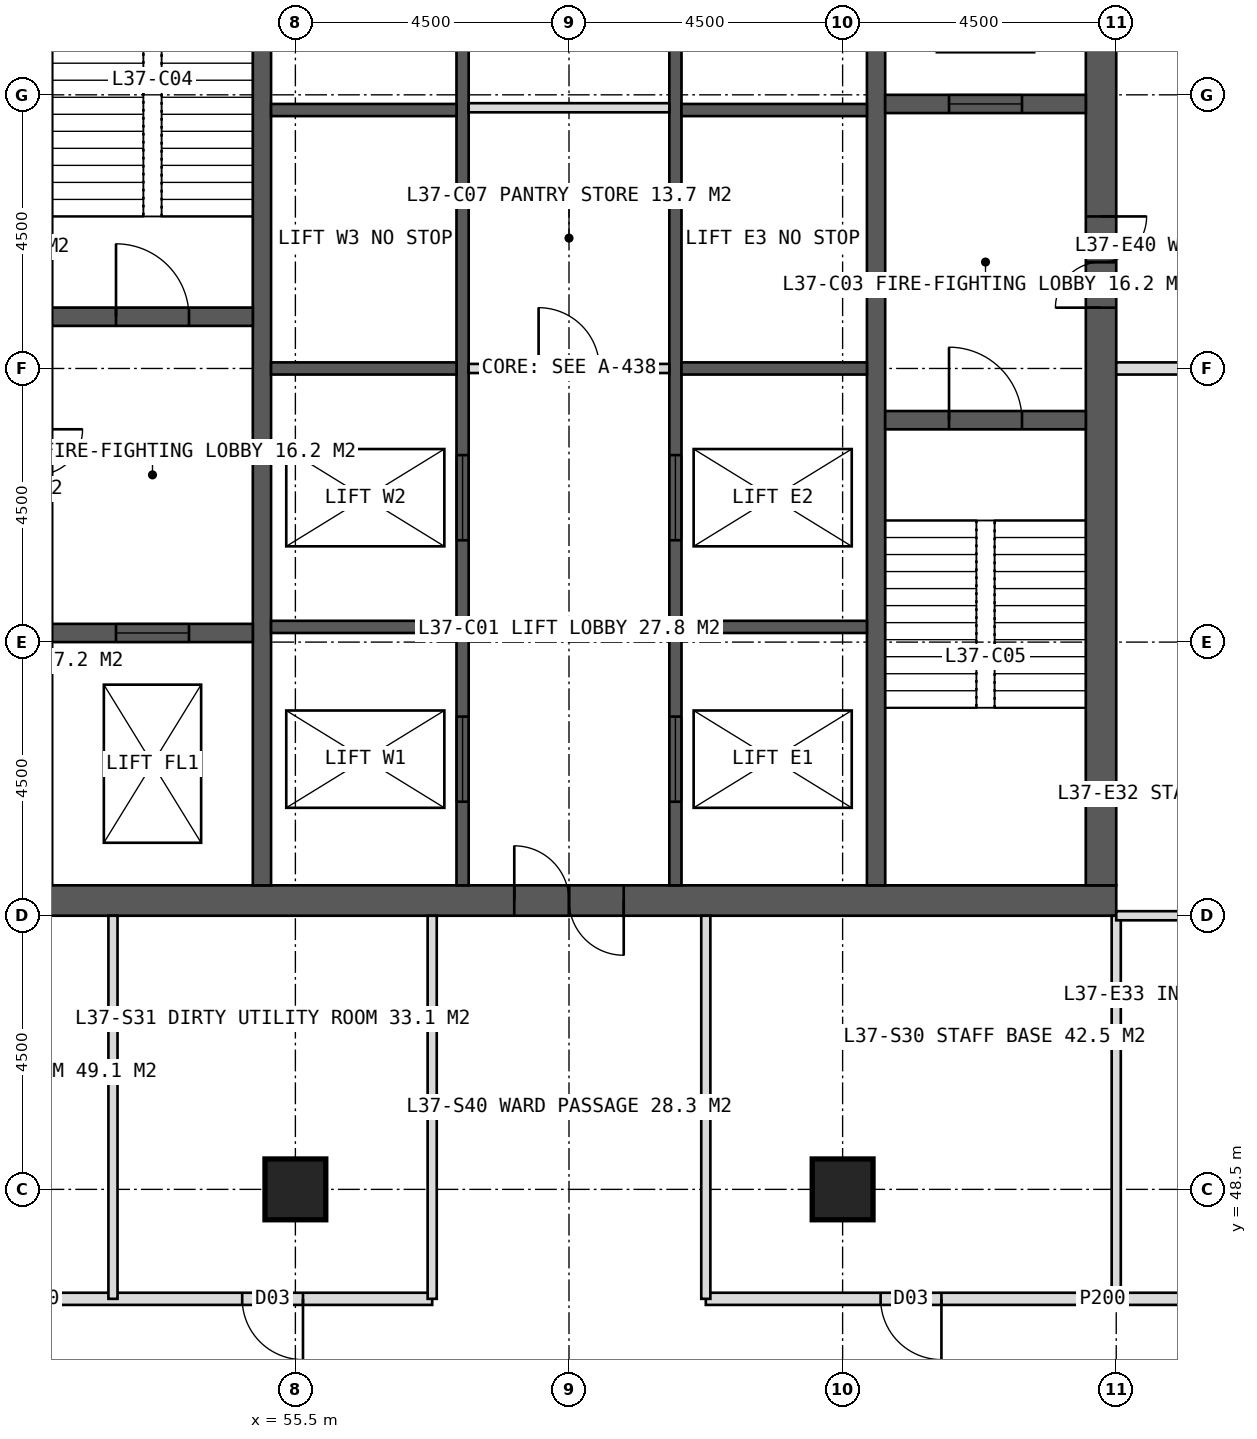
"""IFC4 building model, lengths in metres.
Left out: names, types, materials, properties, quantities, classifications, styles, units other than length and angle.
Written with IfcOpenShell. Run it as: python <this file> out.ifc"""

import sys

from ifc_helpers import new_model, si_unit, direction, frame, frame_2d, origin, origin_2d, place, context, subcontext, project, spatial, rectangle, hollow_rectangle, extrude, element, fill, save


model = new_model("IFC4")
c1 = context("Model", 3, precision=1e-05, world=origin(), true_north=direction((0.0, 1.0)))
c2 = subcontext(c1, "Body", "Model", "MODEL_VIEW")
j1 = project(units=[si_unit("LENGTHUNIT", "METRE"), si_unit("PLANEANGLEUNIT", "RADIAN")], contexts=[c1])
p1 = place(None, origin())
s1 = spatial("IfcSite", under=j1, at=p1, CompositionType="ELEMENT")
p2 = place(p1, origin())
s2 = spatial("IfcBuilding", under=s1, at=p2, CompositionType="ELEMENT")
p3 = place(p2, frame((0.0, 0.0, 156.0)))
s3 = spatial("IfcBuildingStorey", under=s2, at=p3, CompositionType="ELEMENT", Elevation=156.0)
p4 = place(p3, frame((51.0, 53.25, 0.0), z_axis=(0.0, 0.0, 1.0), x_axis=(1.0, 0.0, 0.0)))
e1 = element("IfcWall", 1, at=p4, inside=s3, PredefinedType="SHEAR", context=c2, shape_type="SweptSolid", body=[
    extrude(rectangle(XDim=18.0, YDim=0.5, at=frame_2d((9.0, 0.0))), origin(), (0.0, 0.0, 1.0), 4.0),
])
p5 = place(p4, frame((8.1, 0.0, 0.0)))
e2 = element("IfcOpeningElement", 2, at=p5, cuts=e1, PredefinedType="OPENING", context=c2, shape_type="SweptSolid", body=[
    extrude(rectangle(XDim=1.8, YDim=2.2, at=frame_2d((0.9, 1.1))), frame((0.0, 0.26, 0.0), z_axis=(0.0, -1.0, 0.0), x_axis=(1.0, 0.0, 0.0)), (0.0, 0.0, 1.0), 0.52),
])
p6 = place(p3, frame((68.75, 53.5, 0.0), z_axis=(0.0, 0.0, 1.0), x_axis=(0.0, 1.0, 0.0)))
e3 = element("IfcWall", 3, at=p6, inside=s3, PredefinedType="SHEAR", context=c2, shape_type="SweptSolid", body=[
    extrude(rectangle(XDim=17.0, YDim=0.5, at=frame_2d((8.5, 0.0))), origin(), (0.0, 0.0, 1.0), 4.0),
])
p7 = place(p6, frame((9.5, 0.0, 0.0)))
e4 = element("IfcOpeningElement", 4, at=p7, cuts=e3, PredefinedType="OPENING", context=c2, shape_type="SweptSolid", body=[
    extrude(rectangle(XDim=1.5, YDim=2.2, at=frame_2d((0.75, 1.1))), frame((0.0, 0.26, 0.0), z_axis=(0.0, -1.0, 0.0), x_axis=(1.0, 0.0, 0.0)), (0.0, 0.0, 1.0), 0.52),
])
for number, where, z_axis, x_axis in (
    (5, (54.95, 53.5, 0.0), (0.0, 0.0, 1.0), (0.0, 1.0, 0.0)),
    (6, (65.05, 53.5, 0.0), (0.0, 0.0, 1.0), (0.0, 1.0, 0.0)),
):
    element("IfcWall", number, at=place(p3, frame(where, z_axis=z_axis, x_axis=x_axis)), inside=s3, PredefinedType="SHEAR", context=c2, shape_type="SweptSolid", body=[
        extrude(rectangle(XDim=17.0, YDim=0.3, at=frame_2d((8.5, 0.0))), origin(), (0.0, 0.0, 1.0), 4.0),
    ])
p8 = place(p3, frame((58.25, 53.5, 0.0), z_axis=(0.0, 0.0, 1.0), x_axis=(0.0, 1.0, 0.0)))
e7 = element("IfcWall", 7, at=p8, inside=s3, PredefinedType="SHEAR", context=c2, shape_type="SweptSolid", body=[
    extrude(rectangle(XDim=17.0, YDim=0.2, at=frame_2d((8.5, 0.0))), origin(), (0.0, 0.0, 1.0), 4.0),
])
p9 = place(p8, frame((1.375, 0.0, 0.0)))
e8 = element("IfcOpeningElement", 8, at=p9, cuts=e7, PredefinedType="OPENING", context=c2, shape_type="SweptSolid", body=[
    extrude(rectangle(XDim=1.4, YDim=2.2, at=frame_2d((0.7, 1.1))), frame((0.0, 0.11, 0.0), z_axis=(0.0, -1.0, 0.0), x_axis=(1.0, 0.0, 0.0)), (0.0, 0.0, 1.0), 0.22),
])
p10 = place(p8, frame((5.675, 0.0, 0.0)))
e9 = element("IfcOpeningElement", 9, at=p10, cuts=e7, PredefinedType="OPENING", context=c2, shape_type="SweptSolid", body=[
    extrude(rectangle(XDim=1.4, YDim=2.2, at=frame_2d((0.7, 1.1))), frame((0.0, 0.11, 0.0), z_axis=(0.0, -1.0, 0.0), x_axis=(1.0, 0.0, 0.0)), (0.0, 0.0, 1.0), 0.22),
])
p11 = place(p3, frame((61.75, 53.5, 0.0), z_axis=(0.0, 0.0, 1.0), x_axis=(0.0, 1.0, 0.0)))
e10 = element("IfcWall", 10, at=p11, inside=s3, PredefinedType="SHEAR", context=c2, shape_type="SweptSolid", body=[
    extrude(rectangle(XDim=17.0, YDim=0.2, at=frame_2d((8.5, 0.0))), origin(), (0.0, 0.0, 1.0), 4.0),
])
p12 = place(p11, frame((1.375, 0.0, 0.0)))
e11 = element("IfcOpeningElement", 11, at=p12, cuts=e10, PredefinedType="OPENING", context=c2, shape_type="SweptSolid", body=[
    extrude(rectangle(XDim=1.4, YDim=2.2, at=frame_2d((0.7, 1.1))), frame((0.0, 0.11, 0.0), z_axis=(0.0, -1.0, 0.0), x_axis=(1.0, 0.0, 0.0)), (0.0, 0.0, 1.0), 0.22),
])
p13 = place(p11, frame((5.675, 0.0, 0.0)))
e12 = element("IfcOpeningElement", 12, at=p13, cuts=e10, PredefinedType="OPENING", context=c2, shape_type="SweptSolid", body=[
    extrude(rectangle(XDim=1.4, YDim=2.2, at=frame_2d((0.7, 1.1))), frame((0.0, 0.11, 0.0), z_axis=(0.0, -1.0, 0.0), x_axis=(1.0, 0.0, 0.0)), (0.0, 0.0, 1.0), 0.22),
])
for number, where, z_axis, x_axis in (
    (13, (55.1, 57.75, 0.0), (0.0, 0.0, 1.0), (1.0, 0.0, 0.0)),
    (14, (61.85, 57.75, 0.0), (0.0, 0.0, 1.0), (1.0, 0.0, 0.0)),
    (15, (55.1, 62.0, 0.0), (0.0, 0.0, 1.0), (1.0, 0.0, 0.0)),
    (16, (61.85, 62.0, 0.0), (0.0, 0.0, 1.0), (1.0, 0.0, 0.0)),
    (17, (55.1, 66.25, 0.0), (0.0, 0.0, 1.0), (1.0, 0.0, 0.0)),
    (18, (61.85, 66.25, 0.0), (0.0, 0.0, 1.0), (1.0, 0.0, 0.0)),
):
    element("IfcWall", number, at=place(p3, frame(where, z_axis=z_axis, x_axis=x_axis)), inside=s3, PredefinedType="SHEAR", context=c2, shape_type="SweptSolid", body=[
        extrude(rectangle(XDim=3.05, YDim=0.2, at=frame_2d((1.525, 0.0))), origin(), (0.0, 0.0, 1.0), 4.0),
    ])
p14 = place(p3, frame((51.5, 62.85, 0.0), z_axis=(0.0, 0.0, 1.0), x_axis=(1.0, 0.0, 0.0)))
e19 = element("IfcWall", 19, at=p14, inside=s3, PredefinedType="SHEAR", context=c2, shape_type="SweptSolid", body=[
    extrude(rectangle(XDim=3.3, YDim=0.3, at=frame_2d((1.65, 0.0))), origin(), (0.0, 0.0, 1.0), 4.0),
])
p15 = place(p14, frame((1.05, 0.0, 0.0)))
e20 = element("IfcOpeningElement", 20, at=p15, cuts=e19, PredefinedType="OPENING", context=c2, shape_type="SweptSolid", body=[
    extrude(rectangle(XDim=1.2, YDim=2.1, at=frame_2d((0.6, 1.05))), frame((0.0, 0.16, 0.0), z_axis=(0.0, -1.0, 0.0), x_axis=(1.0, 0.0, 0.0)), (0.0, 0.0, 1.0), 0.32),
])
p16 = place(p3, frame((51.5, 57.65, 0.0), z_axis=(0.0, 0.0, 1.0), x_axis=(1.0, 0.0, 0.0)))
e21 = element("IfcWall", 21, at=p16, inside=s3, PredefinedType="SHEAR", context=c2, shape_type="SweptSolid", body=[
    extrude(rectangle(XDim=3.3, YDim=0.3, at=frame_2d((1.65, 0.0))), origin(), (0.0, 0.0, 1.0), 4.0),
])
p17 = place(p16, frame((1.05, 0.0, 0.0)))
e22 = element("IfcOpeningElement", 22, at=p17, cuts=e21, PredefinedType="OPENING", context=c2, shape_type="SweptSolid", body=[
    extrude(rectangle(XDim=1.2, YDim=2.2, at=frame_2d((0.6, 1.1))), frame((0.0, 0.16, 0.0), z_axis=(0.0, -1.0, 0.0), x_axis=(1.0, 0.0, 0.0)), (0.0, 0.0, 1.0), 0.32),
])
p18 = place(p3, frame((65.2, 61.15, 0.0), z_axis=(0.0, 0.0, 1.0), x_axis=(1.0, 0.0, 0.0)))
e23 = element("IfcWall", 23, at=p18, inside=s3, PredefinedType="SHEAR", context=c2, shape_type="SweptSolid", body=[
    extrude(rectangle(XDim=3.3, YDim=0.3, at=frame_2d((1.65, 0.0))), origin(), (0.0, 0.0, 1.0), 4.0),
])
p19 = place(p18, frame((1.05, 0.0, 0.0)))
e24 = element("IfcOpeningElement", 24, at=p19, cuts=e23, PredefinedType="OPENING", context=c2, shape_type="SweptSolid", body=[
    extrude(rectangle(XDim=1.2, YDim=2.1, at=frame_2d((0.6, 1.05))), frame((0.0, 0.16, 0.0), z_axis=(0.0, -1.0, 0.0), x_axis=(1.0, 0.0, 0.0)), (0.0, 0.0, 1.0), 0.32),
])
p20 = place(p3, frame((65.2, 66.35, 0.0), z_axis=(0.0, 0.0, 1.0), x_axis=(1.0, 0.0, 0.0)))
e25 = element("IfcWall", 25, at=p20, inside=s3, PredefinedType="SHEAR", context=c2, shape_type="SweptSolid", body=[
    extrude(rectangle(XDim=3.3, YDim=0.3, at=frame_2d((1.65, 0.0))), origin(), (0.0, 0.0, 1.0), 4.0),
])
p21 = place(p20, frame((1.05, 0.0, 0.0)))
e26 = element("IfcOpeningElement", 26, at=p21, cuts=e25, PredefinedType="OPENING", context=c2, shape_type="SweptSolid", body=[
    extrude(rectangle(XDim=1.2, YDim=2.2, at=frame_2d((0.6, 1.1))), frame((0.0, 0.16, 0.0), z_axis=(0.0, -1.0, 0.0), x_axis=(1.0, 0.0, 0.0)), (0.0, 0.0, 1.0), 0.32),
])
for number, where, z_axis, x_axis in (
    (27, (55.5, 48.5, 0.0), (0.0, 0.0, 1.0), (1.0, 0.0, 0.0)),
    (28, (64.5, 48.5, 0.0), (0.0, 0.0, 1.0), (1.0, 0.0, 0.0)),
):
    element("IfcColumn", number, at=place(p3, frame(where, z_axis=z_axis, x_axis=x_axis)), inside=s3, PredefinedType="COLUMN", context=c2, shape_type="SweptSolid", body=[
        extrude(hollow_rectangle(XDim=1.0, YDim=1.0, WallThickness=0.1, at=origin_2d()), origin(), (0.0, 0.0, 1.0), 4.0),
    ])
p22 = place(p3, frame((69.0, 53.0, 0.0), z_axis=(0.0, 0.0, 1.0), x_axis=(0.0, -1.0, 0.0)))
e29 = element("IfcWall", 29, at=p22, inside=s3, PredefinedType="PARTITIONING", context=c2, shape_type="SweptSolid", body=[
    extrude(rectangle(XDim=6.3, YDim=0.15, at=frame_2d((3.15, 0.0))), origin(), (0.0, 0.0, 1.0), 3.75),
])
p23 = place(p3, frame((75.3, 46.7, 0.0), z_axis=(0.0, 0.0, 1.0), x_axis=(-1.0, 0.0, 0.0)))
e30 = element("IfcWall", 30, at=p23, inside=s3, PredefinedType="PARTITIONING", context=c2, shape_type="SweptSolid", body=[
    extrude(rectangle(XDim=13.05, YDim=0.2, at=frame_2d((6.525, 0.0))), origin(), (0.0, 0.0, 1.0), 3.75),
])
p24 = place(p23, frame((9.175, 0.0, 0.0)))
e31 = element("IfcOpeningElement", 31, at=p24, cuts=e30, PredefinedType="OPENING", context=c2, shape_type="SweptSolid", body=[
    extrude(rectangle(XDim=1.0, YDim=2.1, at=frame_2d((0.5, 1.05))), frame((0.0, 0.11, 0.0), z_axis=(0.0, -1.0, 0.0), x_axis=(1.0, 0.0, 0.0)), (0.0, 0.0, 1.0), 0.22),
])
p25 = place(p3, frame((57.75, 46.7, 0.0), z_axis=(0.0, 0.0, 1.0), x_axis=(-1.0, 0.0, 0.0)))
e32 = element("IfcWall", 32, at=p25, inside=s3, PredefinedType="PARTITIONING", context=c2, shape_type="SweptSolid", body=[
    extrude(rectangle(XDim=13.05, YDim=0.2, at=frame_2d((6.525, 0.0))), origin(), (0.0, 0.0, 1.0), 3.75),
])
p26 = place(p25, frame((2.125, 0.0, 0.0)))
e33 = element("IfcOpeningElement", 33, at=p26, cuts=e32, PredefinedType="OPENING", context=c2, shape_type="SweptSolid", body=[
    extrude(rectangle(XDim=1.0, YDim=2.1, at=frame_2d((0.5, 1.05))), frame((0.0, 0.11, 0.0), z_axis=(0.0, -1.0, 0.0), x_axis=(1.0, 0.0, 0.0)), (0.0, 0.0, 1.0), 0.22),
])
p27 = place(p25, frame((8.65, 0.0, 0.0)))
e34 = element("IfcOpeningElement", 34, at=p27, cuts=e32, PredefinedType="OPENING", context=c2, shape_type="SweptSolid", body=[
    extrude(rectangle(XDim=1.0, YDim=2.1, at=frame_2d((0.5, 1.05))), frame((0.0, 0.11, 0.0), z_axis=(0.0, -1.0, 0.0), x_axis=(1.0, 0.0, 0.0)), (0.0, 0.0, 1.0), 0.22),
])
for number, where, z_axis, x_axis in (
    (35, (62.25, 53.0, 0.0), (0.0, 0.0, 1.0), (0.0, -1.0, 0.0)),
    (36, (57.75, 53.0, 0.0), (0.0, 0.0, 1.0), (0.0, -1.0, 0.0)),
    (37, (52.5, 53.0, 0.0), (0.0, 0.0, 1.0), (0.0, -1.0, 0.0)),
):
    element("IfcWall", number, at=place(p3, frame(where, z_axis=z_axis, x_axis=x_axis)), inside=s3, PredefinedType="PARTITIONING", context=c2, shape_type="SweptSolid", body=[
        extrude(rectangle(XDim=6.3, YDim=0.15, at=frame_2d((3.15, 0.0))), origin(), (0.0, 0.0, 1.0), 3.75),
    ])
p28 = place(p3, frame((69.0, 62.0, 0.0), z_axis=(0.0, 0.0, 1.0), x_axis=(1.0, 0.0, 0.0)))
e38 = element("IfcWall", 38, at=p28, inside=s3, PredefinedType="SOLIDWALL", context=c2, shape_type="SweptSolid", body=[
    extrude(rectangle(XDim=6.3, YDim=0.2, at=frame_2d((3.15, 0.0))), origin(), (0.0, 0.0, 1.0), 2.95),
])
p29 = place(p3, frame((69.0, 53.0, 0.0), z_axis=(0.0, 0.0, 1.0), x_axis=(1.0, 0.0, 0.0)))
e39 = element("IfcWall", 39, at=p29, inside=s3, PredefinedType="PARTITIONING", context=c2, shape_type="SweptSolid", body=[
    extrude(rectangle(XDim=6.3, YDim=0.15, at=frame_2d((3.15, 0.0))), origin(), (0.0, 0.0, 1.0), 3.75),
])
p30 = place(p3, frame((58.35, 62.0, 0.0), z_axis=(0.0, 0.0, 1.0), x_axis=(1.0, 0.0, 0.0)))
e40 = element("IfcWall", 40, at=p30, inside=s3, PredefinedType="PARTITIONING", context=c2, shape_type="SweptSolid", body=[
    extrude(rectangle(XDim=3.3, YDim=0.15, at=frame_2d((1.65, 0.0))), origin(), (0.0, 0.0, 1.0), 3.75),
])
p31 = place(p30, frame((1.15, 0.0, 0.0)))
e41 = element("IfcOpeningElement", 41, at=p31, cuts=e40, PredefinedType="OPENING", context=c2, shape_type="SweptSolid", body=[
    extrude(rectangle(XDim=1.0, YDim=2.1, at=frame_2d((0.5, 1.05))), frame((0.0, 0.085, 0.0), z_axis=(0.0, -1.0, 0.0), x_axis=(1.0, 0.0, 0.0)), (0.0, 0.0, 1.0), 0.17),
])
p32 = place(p3, frame((58.35, 66.288, 0.0), z_axis=(0.0, 0.0, 1.0), x_axis=(1.0, 0.0, 0.0)))
e42 = element("IfcWall", 42, at=p32, inside=s3, PredefinedType="PARTITIONING", context=c2, shape_type="SweptSolid", body=[
    extrude(rectangle(XDim=3.3, YDim=0.15, at=frame_2d((1.65, 0.0))), origin(), (0.0, 0.0, 1.0), 3.75),
])
p33 = place(p24, origin())
e43 = element("IfcDoor", 43, at=p33, inside=s3, OperationType="SINGLE_SWING_LEFT", PredefinedType="DOOR", context=c2, shape_type="SweptSolid", body=[
    extrude(rectangle(XDim=1.0, YDim=2.1, at=frame_2d((0.5, 1.05))), frame((0.0, 0.025, 0.0), z_axis=(0.0, -1.0, 0.0), x_axis=(1.0, 0.0, 0.0)), (0.0, 0.0, 1.0), 0.05),
])
fill(e31, e43)
p34 = place(p26, origin())
e44 = element("IfcDoor", 44, at=p34, inside=s3, OperationType="SINGLE_SWING_LEFT", PredefinedType="DOOR", context=c2, shape_type="SweptSolid", body=[
    extrude(rectangle(XDim=1.0, YDim=2.1, at=frame_2d((0.5, 1.05))), frame((0.0, 0.025, 0.0), z_axis=(0.0, -1.0, 0.0), x_axis=(1.0, 0.0, 0.0)), (0.0, 0.0, 1.0), 0.05),
])
fill(e33, e44)
p35 = place(p5, origin())
e45 = element("IfcDoor", 45, at=p35, inside=s3, OperationType="DOUBLE_DOOR_SINGLE_SWING", PredefinedType="DOOR", context=c2, shape_type="SweptSolid", body=[
    extrude(rectangle(XDim=1.8, YDim=2.2, at=frame_2d((0.9, 1.1))), frame((0.0, 0.025, 0.0), z_axis=(0.0, -1.0, 0.0), x_axis=(1.0, 0.0, 0.0)), (0.0, 0.0, 1.0), 0.05),
])
fill(e2, e45)
p36 = place(p7, origin())
e46 = element("IfcDoor", 46, at=p36, inside=s3, OperationType="DOUBLE_DOOR_SINGLE_SWING", PredefinedType="DOOR", context=c2, shape_type="SweptSolid", body=[
    extrude(rectangle(XDim=1.5, YDim=2.2, at=frame_2d((0.75, 1.1))), frame((0.0, 0.025, 0.0), z_axis=(0.0, -1.0, 0.0), x_axis=(1.0, 0.0, 0.0)), (0.0, 0.0, 1.0), 0.05),
])
fill(e4, e46)
p37 = place(p15, origin())
e47 = element("IfcDoor", 47, at=p37, inside=s3, OperationType="SINGLE_SWING_LEFT", PredefinedType="DOOR", context=c2, shape_type="SweptSolid", body=[
    extrude(rectangle(XDim=1.2, YDim=2.1, at=frame_2d((0.6, 1.05))), frame((0.0, 0.025, 0.0), z_axis=(0.0, -1.0, 0.0), x_axis=(1.0, 0.0, 0.0)), (0.0, 0.0, 1.0), 0.05),
])
fill(e20, e47)
p38 = place(p19, origin())
e48 = element("IfcDoor", 48, at=p38, inside=s3, OperationType="SINGLE_SWING_LEFT", PredefinedType="DOOR", context=c2, shape_type="SweptSolid", body=[
    extrude(rectangle(XDim=1.2, YDim=2.1, at=frame_2d((0.6, 1.05))), frame((0.0, 0.025, 0.0), z_axis=(0.0, -1.0, 0.0), x_axis=(1.0, 0.0, 0.0)), (0.0, 0.0, 1.0), 0.05),
])
fill(e24, e48)
p39 = place(p17, origin())
e49 = element("IfcDoor", 49, at=p39, inside=s3, OperationType="SLIDING_TO_LEFT", PredefinedType="DOOR", context=c2, shape_type="SweptSolid", body=[
    extrude(rectangle(XDim=1.2, YDim=2.2, at=frame_2d((0.6, 1.1))), frame((0.0, 0.025, 0.0), z_axis=(0.0, -1.0, 0.0), x_axis=(1.0, 0.0, 0.0)), (0.0, 0.0, 1.0), 0.05),
])
fill(e22, e49)
p40 = place(p21, origin())
e50 = element("IfcDoor", 50, at=p40, inside=s3, OperationType="SLIDING_TO_LEFT", PredefinedType="DOOR", context=c2, shape_type="SweptSolid", body=[
    extrude(rectangle(XDim=1.2, YDim=2.2, at=frame_2d((0.6, 1.1))), frame((0.0, 0.025, 0.0), z_axis=(0.0, -1.0, 0.0), x_axis=(1.0, 0.0, 0.0)), (0.0, 0.0, 1.0), 0.05),
])
fill(e26, e50)
p41 = place(p9, origin())
e51 = element("IfcDoor", 51, at=p41, inside=s3, OperationType="SLIDING_TO_LEFT", PredefinedType="DOOR", context=c2, shape_type="SweptSolid", body=[
    extrude(rectangle(XDim=1.4, YDim=2.2, at=frame_2d((0.7, 1.1))), frame((0.0, 0.025, 0.0), z_axis=(0.0, -1.0, 0.0), x_axis=(1.0, 0.0, 0.0)), (0.0, 0.0, 1.0), 0.05),
])
fill(e8, e51)
p42 = place(p12, origin())
e52 = element("IfcDoor", 52, at=p42, inside=s3, OperationType="SLIDING_TO_LEFT", PredefinedType="DOOR", context=c2, shape_type="SweptSolid", body=[
    extrude(rectangle(XDim=1.4, YDim=2.2, at=frame_2d((0.7, 1.1))), frame((0.0, 0.025, 0.0), z_axis=(0.0, -1.0, 0.0), x_axis=(1.0, 0.0, 0.0)), (0.0, 0.0, 1.0), 0.05),
])
fill(e11, e52)
p43 = place(p10, origin())
e53 = element("IfcDoor", 53, at=p43, inside=s3, OperationType="SLIDING_TO_LEFT", PredefinedType="DOOR", context=c2, shape_type="SweptSolid", body=[
    extrude(rectangle(XDim=1.4, YDim=2.2, at=frame_2d((0.7, 1.1))), frame((0.0, 0.025, 0.0), z_axis=(0.0, -1.0, 0.0), x_axis=(1.0, 0.0, 0.0)), (0.0, 0.0, 1.0), 0.05),
])
fill(e9, e53)
p44 = place(p13, origin())
e54 = element("IfcDoor", 54, at=p44, inside=s3, OperationType="SLIDING_TO_LEFT", PredefinedType="DOOR", context=c2, shape_type="SweptSolid", body=[
    extrude(rectangle(XDim=1.4, YDim=2.2, at=frame_2d((0.7, 1.1))), frame((0.0, 0.025, 0.0), z_axis=(0.0, -1.0, 0.0), x_axis=(1.0, 0.0, 0.0)), (0.0, 0.0, 1.0), 0.05),
])
fill(e12, e54)
p45 = place(p31, origin())
e55 = element("IfcDoor", 55, at=p45, inside=s3, OperationType="SINGLE_SWING_LEFT", PredefinedType="DOOR", context=c2, shape_type="SweptSolid", body=[
    extrude(rectangle(XDim=1.0, YDim=2.1, at=frame_2d((0.5, 1.05))), frame((0.0, 0.025, 0.0), z_axis=(0.0, -1.0, 0.0), x_axis=(1.0, 0.0, 0.0)), (0.0, 0.0, 1.0), 0.05),
])
fill(e41, e55)
save(model, sys.argv[1])
